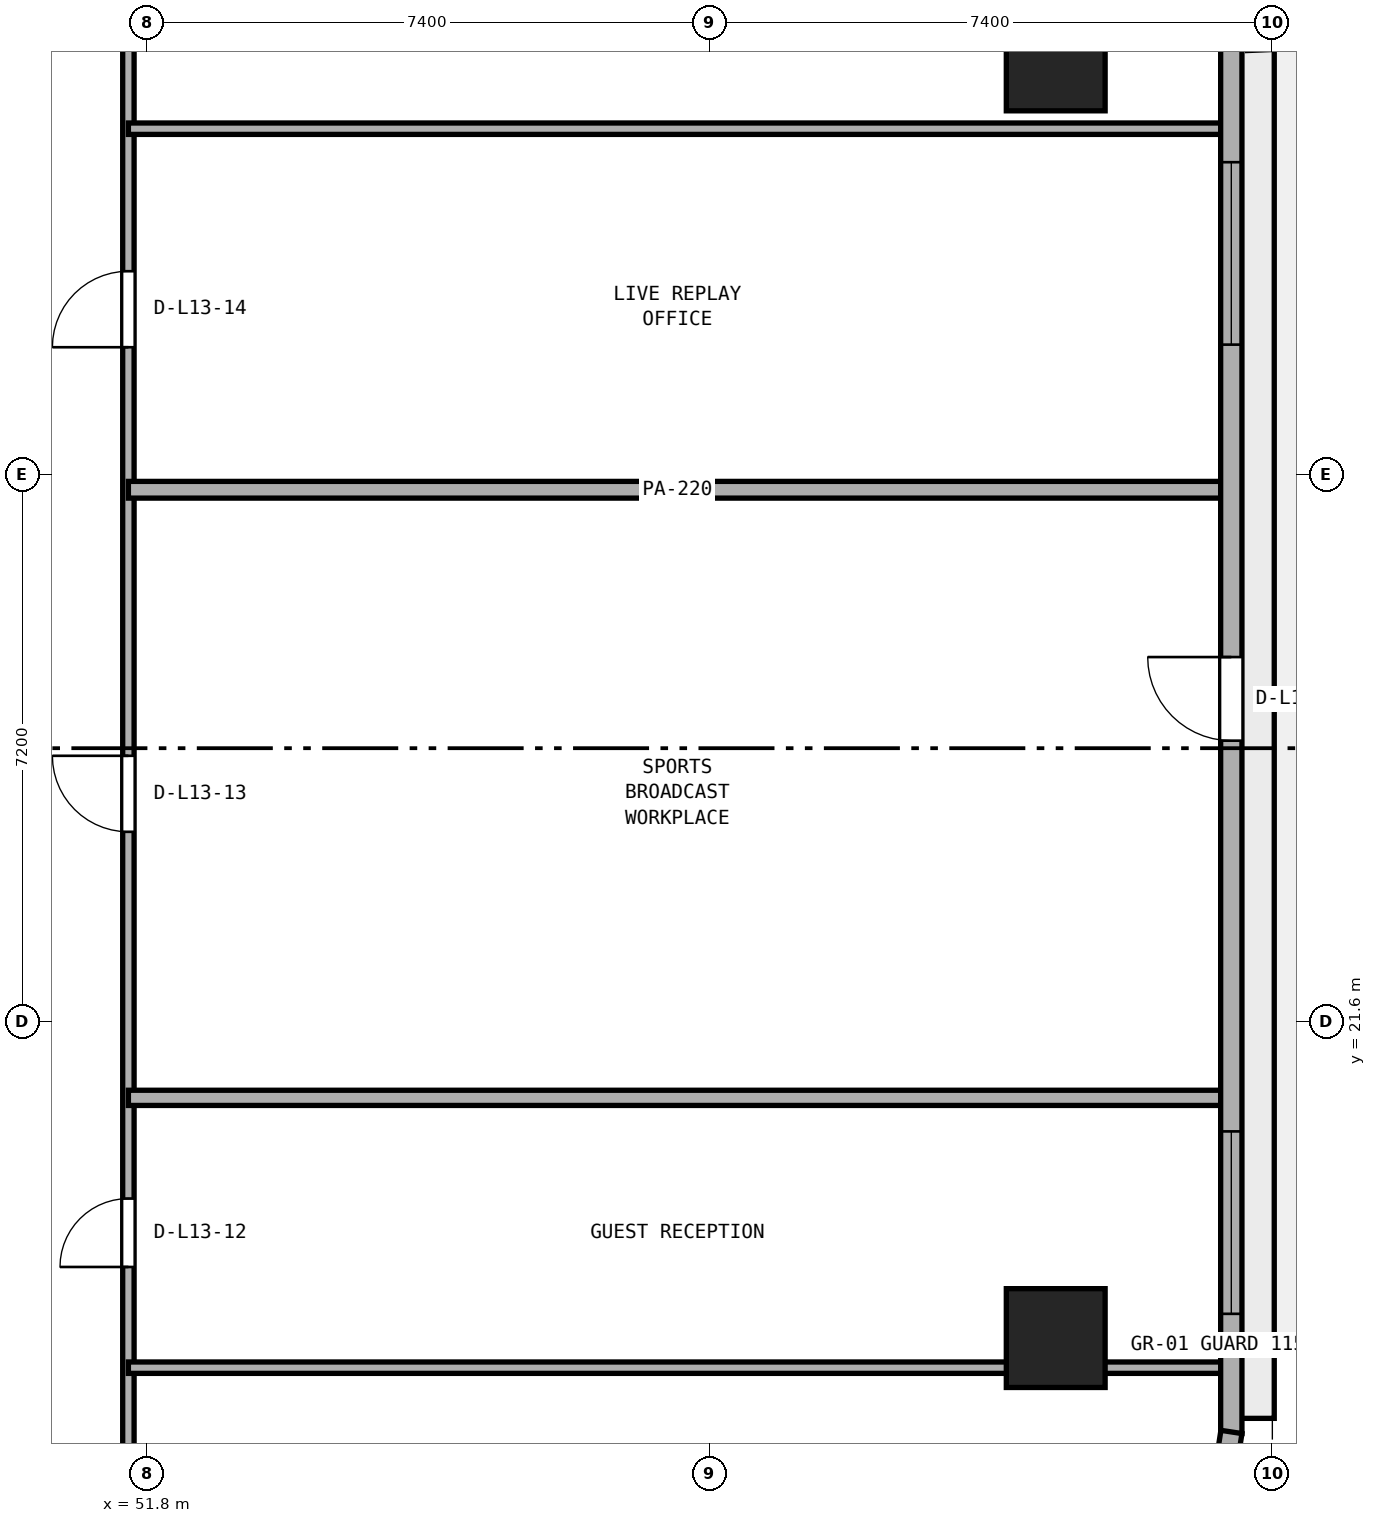
"""IFC4 building model, lengths in metres.
Left out: names, types, materials, properties, quantities, classifications, styles, units other than length and angle.
Written with IfcOpenShell. Run it as: python <this file> out.ifc"""

import sys

from ifc_helpers import new_model, si_unit, direction, frame, frame_2d, origin, origin_2d, place, context, subcontext, project, spatial, rectangle, extrude, element, fill, save


model = new_model("IFC4")
c1 = context("Model", 3, precision=1e-05, world=origin(), true_north=direction((0.0, 1.0)))
c2 = subcontext(c1, "Body", "Model", "MODEL_VIEW")
j1 = project(units=[si_unit("LENGTHUNIT", "METRE"), si_unit("PLANEANGLEUNIT", "RADIAN")], contexts=[c1])
p1 = place(None, origin())
s1 = spatial("IfcSite", under=j1, at=p1, CompositionType="ELEMENT")
p2 = place(p1, origin())
s2 = spatial("IfcBuilding", under=s1, at=p2, CompositionType="ELEMENT")
p3 = place(p2, frame((0.0, 0.0, 55.4)))
s3 = spatial("IfcBuildingStorey", under=s2, at=p3, CompositionType="ELEMENT", Elevation=55.4)
for number, where, z_axis, x_axis in (
    (1, (63.75, 17.44, 0.0), (0.0, 0.0, 1.0), (1.0, 0.0, 0.0)),
    (2, (63.75, 34.235, 0.0), (0.0, 0.0, 1.0), (1.0, 0.0, 0.0)),
):
    element("IfcColumn", number, at=place(p3, frame(where, z_axis=z_axis, x_axis=x_axis)), inside=s3, PredefinedType="COLUMN", context=c2, shape_type="SweptSolid", body=[
        extrude(rectangle(XDim=1.3, YDim=1.3, at=origin_2d()), origin(), (0.0, 0.0, 1.0), 3.8),
    ])
p4 = place(p3, frame((51.55, 14.05, 0.0), z_axis=(0.0, 0.0, 1.0), x_axis=(0.0, 1.0, 0.0)))
e3 = element("IfcWall", 3, at=p4, inside=s3, PredefinedType="PARTITIONING", context=c2, shape_type="SweptSolid", body=[
    extrude(rectangle(XDim=22.3, YDim=0.15, at=frame_2d((11.15, 0.0))), origin(), (0.0, 0.0, 1.0), 3.525),
])
p5 = place(p4, frame((4.325, 0.0, 0.0)))
e4 = element("IfcOpeningElement", 4, at=p5, cuts=e3, PredefinedType="OPENING", context=c2, shape_type="SweptSolid", body=[
    extrude(rectangle(XDim=0.9, YDim=2.1, at=frame_2d((0.45, 1.05))), frame((0.0, 0.085, 0.0), z_axis=(0.0, -1.0, 0.0), x_axis=(1.0, 0.0, 0.0)), (0.0, 0.0, 1.0), 0.17),
])
p6 = place(p4, frame((10.05, 0.0, 0.0)))
e5 = element("IfcOpeningElement", 5, at=p6, cuts=e3, PredefinedType="OPENING", context=c2, shape_type="SweptSolid", body=[
    extrude(rectangle(XDim=1.0, YDim=2.12, at=frame_2d((0.5, 1.06))), frame((0.0, 0.085, 0.0), z_axis=(0.0, -1.0, 0.0), x_axis=(1.0, 0.0, 0.0)), (0.0, 0.0, 1.0), 0.17),
])
p7 = place(p4, frame((16.425, 0.0, 0.0)))
e6 = element("IfcOpeningElement", 6, at=p7, cuts=e3, PredefinedType="OPENING", context=c2, shape_type="SweptSolid", body=[
    extrude(rectangle(XDim=1.0, YDim=2.12, at=frame_2d((0.5, 1.06))), frame((0.0, 0.085, 0.0), z_axis=(0.0, -1.0, 0.0), x_axis=(1.0, 0.0, 0.0)), (0.0, 0.0, 1.0), 0.17),
])
p8 = place(p3, frame((51.55, 17.05, 0.0), z_axis=(0.0, 0.0, 1.0), x_axis=(1.0, 0.0, 0.0)))
e7 = element("IfcWall", 7, at=p8, inside=s3, PredefinedType="PARTITIONING", context=c2, shape_type="SweptSolid", body=[
    extrude(rectangle(XDim=14.445, YDim=0.15, at=frame_2d((7.223, 0.0))), origin(), (0.0, 0.0, 1.0), 3.525),
])
p9 = place(p3, frame((51.55, 20.6, 0.0), z_axis=(0.0, 0.0, 1.0), x_axis=(1.0, 0.0, 0.0)))
e8 = element("IfcWall", 8, at=p9, inside=s3, PredefinedType="PARTITIONING", context=c2, shape_type="SweptSolid", body=[
    extrude(rectangle(XDim=14.445, YDim=0.2, at=frame_2d((7.223, 0.0))), origin(), (0.0, 0.0, 1.0), 3.525),
])
p10 = place(p3, frame((51.55, 28.6, 0.0), z_axis=(0.0, 0.0, 1.0), x_axis=(1.0, 0.0, 0.0)))
e9 = element("IfcWall", 9, at=p10, inside=s3, PredefinedType="PARTITIONING", context=c2, shape_type="SweptSolid", body=[
    extrude(rectangle(XDim=14.445, YDim=0.22, at=frame_2d((7.223, 0.0))), origin(), (0.0, 0.0, 1.0), 3.525),
])
p11 = place(p3, frame((51.55, 33.35, 0.0), z_axis=(0.0, 0.0, 1.0), x_axis=(1.0, 0.0, 0.0)))
e10 = element("IfcWall", 10, at=p11, inside=s3, PredefinedType="PARTITIONING", context=c2, shape_type="SweptSolid", body=[
    extrude(rectangle(XDim=14.445, YDim=0.15, at=frame_2d((7.223, 0.0))), origin(), (0.0, 0.0, 1.0), 2.908),
])
p12 = place(p3, frame((66.06, 16.183, 0.0), z_axis=(0.0, 0.0, 1.0), x_axis=(0.0, 1.0, 0.0)))
e11 = element("IfcWall", 11, at=p12, inside=s3, PredefinedType="STANDARD", context=c2, shape_type="SweptSolid", body=[
    extrude(rectangle(XDim=19.331, YDim=0.28, at=frame_2d((9.666, 0.0))), origin(), (0.0, 0.0, 1.0), 3.525),
])
p13 = place(p12, frame((9.115, 0.0, 0.0)))
e12 = element("IfcOpeningElement", 12, at=p13, cuts=e11, PredefinedType="OPENING", context=c2, shape_type="SweptSolid", body=[
    extrude(rectangle(XDim=1.1, YDim=2.2, at=frame_2d((0.55, 1.1))), frame((0.0, 0.15, 0.0), z_axis=(0.0, -1.0, 0.0), x_axis=(1.0, 0.0, 0.0)), (0.0, 0.0, 1.0), 0.3),
])
p14 = place(p12, frame((1.575, 0.0, 0.9)))
e13 = element("IfcOpeningElement", 13, at=p14, cuts=e11, PredefinedType="OPENING", context=c2, shape_type="SweptSolid", body=[
    extrude(rectangle(XDim=2.4, YDim=1.75, at=frame_2d((1.2, 0.875))), frame((0.0, 0.15, 0.0), z_axis=(0.0, -1.0, 0.0), x_axis=(1.0, 0.0, 0.0)), (0.0, 0.0, 1.0), 0.3),
])
p15 = place(p12, frame((14.326, 0.0, 0.9)))
e14 = element("IfcOpeningElement", 14, at=p15, cuts=e11, PredefinedType="OPENING", context=c2, shape_type="SweptSolid", body=[
    extrude(rectangle(XDim=2.4, YDim=1.75, at=frame_2d((1.2, 0.875))), frame((0.0, 0.15, 0.0), z_axis=(0.0, -1.0, 0.0), x_axis=(1.0, 0.0, 0.0)), (0.0, 0.0, 1.0), 0.3),
])
p16 = place(p3, frame((65.867, 14.943, 0.0), z_axis=(0.0, 0.0, 1.0), x_axis=(0.152014078361, 0.988378328364, 0.0)))
e15 = element("IfcWall", 15, at=p16, inside=s3, PredefinedType="STANDARD", context=c2, shape_type="SweptSolid", body=[
    extrude(rectangle(XDim=1.277, YDim=0.28, at=frame_2d((0.638, 0.0))), origin(), (0.0, 0.0, 1.0), 3.525),
])
p17 = place(p5, origin())
e16 = element("IfcDoor", 16, at=p17, inside=s3, OperationType="SINGLE_SWING_LEFT", PredefinedType="DOOR", context=c2, shape_type="SweptSolid", body=[
    extrude(rectangle(XDim=0.9, YDim=2.1, at=frame_2d((0.45, 1.05))), frame((0.0, 0.025, 0.0), z_axis=(0.0, -1.0, 0.0), x_axis=(1.0, 0.0, 0.0)), (0.0, 0.0, 1.0), 0.05),
])
fill(e4, e16)
p18 = place(p6, origin())
e17 = element("IfcDoor", 17, at=p18, inside=s3, OperationType="SINGLE_SWING_RIGHT", PredefinedType="DOOR", context=c2, shape_type="SweptSolid", body=[
    extrude(rectangle(XDim=1.0, YDim=2.12, at=frame_2d((0.5, 1.06))), frame((0.0, 0.025, 0.0), z_axis=(0.0, -1.0, 0.0), x_axis=(1.0, 0.0, 0.0)), (0.0, 0.0, 1.0), 0.05),
])
fill(e5, e17)
p19 = place(p7, origin())
e18 = element("IfcDoor", 18, at=p19, inside=s3, OperationType="SINGLE_SWING_LEFT", PredefinedType="DOOR", context=c2, shape_type="SweptSolid", body=[
    extrude(rectangle(XDim=1.0, YDim=2.12, at=frame_2d((0.5, 1.06))), frame((0.0, 0.025, 0.0), z_axis=(0.0, -1.0, 0.0), x_axis=(1.0, 0.0, 0.0)), (0.0, 0.0, 1.0), 0.05),
])
fill(e6, e18)
p20 = place(p13, origin())
e19 = element("IfcDoor", 19, at=p20, inside=s3, OperationType="SINGLE_SWING_RIGHT", PredefinedType="DOOR", context=c2, shape_type="SweptSolid", body=[
    extrude(rectangle(XDim=1.1, YDim=2.2, at=frame_2d((0.55, 1.1))), frame((0.0, 0.025, 0.0), z_axis=(0.0, -1.0, 0.0), x_axis=(1.0, 0.0, 0.0)), (0.0, 0.0, 1.0), 0.05),
])
fill(e12, e19)
p21 = place(p14, origin())
e20 = element("IfcWindow", 20, at=p21, inside=s3, PartitioningType="SINGLE_PANEL", PredefinedType="WINDOW", context=c2, shape_type="SweptSolid", body=[
    extrude(rectangle(XDim=2.4, YDim=1.75, at=frame_2d((1.2, 0.875))), frame((0.0, 0.03, 0.0), z_axis=(0.0, -1.0, 0.0), x_axis=(1.0, 0.0, 0.0)), (0.0, 0.0, 1.0), 0.06),
])
fill(e13, e20)
p22 = place(p15, origin())
e21 = element("IfcWindow", 21, at=p22, inside=s3, PartitioningType="SINGLE_PANEL", PredefinedType="WINDOW", context=c2, shape_type="SweptSolid", body=[
    extrude(rectangle(XDim=2.4, YDim=1.75, at=frame_2d((1.2, 0.875))), frame((0.0, 0.03, 0.0), z_axis=(0.0, -1.0, 0.0), x_axis=(1.0, 0.0, 0.0)), (0.0, 0.0, 1.0), 0.06),
])
fill(e14, e21)
save(model, sys.argv[1])
